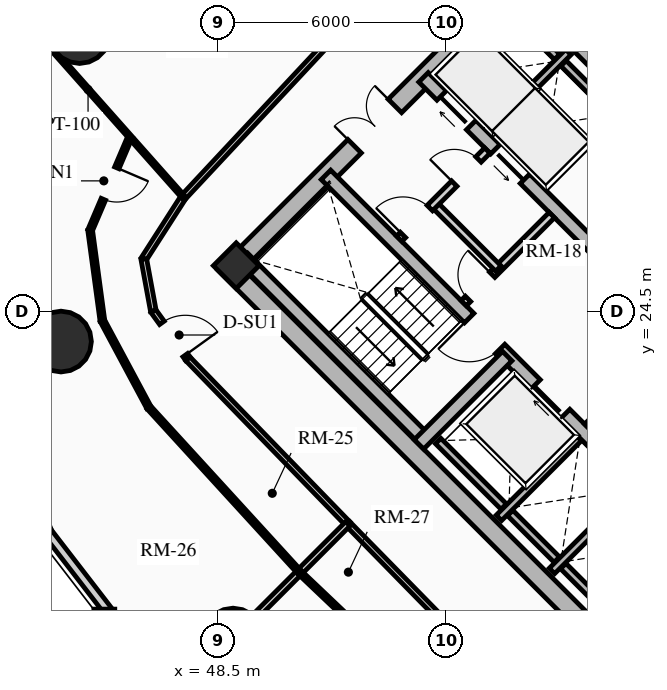
"""IFC4 building model, lengths in metres.
Left out: names, types, materials, properties, quantities, classifications, styles, units other than length and angle.
Written with IfcOpenShell. Run it as: python <this file> out.ifc"""

import sys

from ifc_helpers import new_model, si_unit, direction, frame, frame_2d, origin, origin_2d, place, context, subcontext, project, spatial, rectangle, circle, extrude, source, transform, mapped, element, fill, save


model = new_model("IFC4")
c1 = context("Model", 3, precision=1e-05, world=origin(), true_north=direction((0.0, 1.0)))
c2 = subcontext(c1, "Body", "Model", "MODEL_VIEW")
j1 = project(units=[si_unit("LENGTHUNIT", "METRE"), si_unit("PLANEANGLEUNIT", "RADIAN")], contexts=[c1])
p1 = place(None, origin())
s1 = spatial("IfcSite", under=j1, at=p1, CompositionType="ELEMENT")
p2 = place(p1, origin())
s2 = spatial("IfcBuilding", under=s1, at=p2, CompositionType="ELEMENT")
p3 = place(p2, frame((0.0, 0.0, 24.91)))
s3 = spatial("IfcBuildingStorey", under=s2, at=p3, CompositionType="ELEMENT", Elevation=24.91)
for number, where, z_axis, x_axis in (
    (1, (58.773, 15.661, 0.0), (0.0, 0.0, 1.0), (-0.707, 0.707, 0.0)),
    (2, (66.339, 23.227, 0.0), (0.0, 0.0, 1.0), (-0.707, 0.707, 0.0)),
):
    element("IfcWall", number, at=place(p3, frame(where, z_axis=z_axis, x_axis=x_axis)), inside=s3, PredefinedType="SHEAR", context=c2, shape_type="SweptSolid", body=[
        extrude(rectangle(XDim=14.3, YDim=0.5, at=frame_2d((7.15, 0.0))), origin(), (0.0, 0.0, 1.0), 2.91),
    ])
p4 = place(p3, frame((48.838, 25.596, 0.0), z_axis=(0.0, 0.0, 1.0), x_axis=(0.707106781187, 0.707106781187, 0.0)))
e3 = element("IfcWall", 3, at=p4, inside=s3, PredefinedType="SHEAR", context=c2, shape_type="SweptSolid", body=[
    extrude(rectangle(XDim=10.7, YDim=0.5, at=frame_2d((5.35, 0.0))), origin(), (0.0, 0.0, 1.0), 2.91),
])
m1 = source(origin(), c2, "Body", "SweptSolid", [
    extrude(rectangle(XDim=1.5, YDim=2.02, at=frame_2d((0.75, 1.01))), frame((0.0, 0.26, 0.0), z_axis=(0.0, -1.0, 0.0), x_axis=(1.0, 0.0, 0.0)), (0.0, 0.0, 1.0), 0.52),
])
p5 = place(p4, frame((4.6, 0.0, 0.0)))
e4 = element("IfcOpeningElement", 4, at=p5, cuts=e3, PredefinedType="OPENING", context=c2, shape_type="MappedRepresentation", body=[
    mapped(m1, transform((0.0, 0.0, 0.0), x_axis=(1.0, 0.0, 0.0), y_axis=(0.0, 1.0, 0.0), z_axis=(0.0, 0.0, 1.0), scale=1.0)),
])
p6 = place(p3, frame((61.096, 18.338, 0.0), z_axis=(0.0, 0.0, 1.0), x_axis=(-0.707106781187, 0.707106781187, 0.0)))
e5 = element("IfcWall", 5, at=p6, inside=s3, PredefinedType="SHEAR", context=c2, shape_type="SweptSolid", body=[
    extrude(rectangle(XDim=13.8, YDim=0.35, at=frame_2d((6.9, 0.0))), origin(), (0.0, 0.0, 1.0), 2.91),
])
m2 = source(origin(), c2, "Body", "SweptSolid", [
    extrude(rectangle(XDim=1.1, YDim=2.015, at=frame_2d((0.55, 1.007))), frame((0.0, 0.185, 0.0), z_axis=(0.0, -1.0, 0.0), x_axis=(1.0, 0.0, 0.0)), (0.0, 0.0, 1.0), 0.37),
])
p7 = place(p6, frame((4.9, 0.0, 0.0)))
e6 = element("IfcOpeningElement", 6, at=p7, cuts=e5, PredefinedType="OPENING", context=c2, shape_type="MappedRepresentation", body=[
    mapped(m2, transform((0.0, 0.0, 0.0), x_axis=(1.0, 0.0, 0.0), y_axis=(0.0, 1.0, 0.0), z_axis=(0.0, 0.0, 1.0), scale=1.0)),
])
m3 = source(origin(), c2, "Body", "SweptSolid", [
    extrude(rectangle(XDim=1.15, YDim=2.02, at=frame_2d((0.575, 1.01))), frame((0.0, 0.185, 0.0), z_axis=(0.0, -1.0, 0.0), x_axis=(1.0, 0.0, 0.0)), (0.0, 0.0, 1.0), 0.37),
])
p8 = place(p6, frame((7.32, 0.0, 0.0)))
e7 = element("IfcOpeningElement", 7, at=p8, cuts=e5, PredefinedType="OPENING", context=c2, shape_type="MappedRepresentation", body=[
    mapped(m3, transform((0.0, 0.0, 0.0), x_axis=(1.0, 0.0, 0.0), y_axis=(0.0, 1.0, 0.0), z_axis=(0.0, 0.0, 1.0), scale=1.0)),
])
p9 = place(p3, frame((63.662, 20.904, 0.0), z_axis=(0.0, 0.0, 1.0), x_axis=(-0.707106781187, 0.707106781187, 0.0)))
e8 = element("IfcWall", 8, at=p9, inside=s3, PredefinedType="SHEAR", context=c2, shape_type="SweptSolid", body=[
    extrude(rectangle(XDim=13.8, YDim=0.35, at=frame_2d((6.9, 0.0))), origin(), (0.0, 0.0, 1.0), 2.91),
])
p10 = place(p9, frame((10.025, 0.0, 0.0)))
e9 = element("IfcOpeningElement", 9, at=p10, cuts=e8, PredefinedType="OPENING", context=c2, shape_type="MappedRepresentation", body=[
    mapped(m2, transform((0.0, 0.0, 0.0), x_axis=(1.0, 0.0, 0.0), y_axis=(0.0, 1.0, 0.0), z_axis=(0.0, 0.0, 1.0), scale=1.0)),
])
p11 = place(p9, frame((12.025, 0.0, 0.0)))
e10 = element("IfcOpeningElement", 10, at=p11, cuts=e8, PredefinedType="OPENING", context=c2, shape_type="MappedRepresentation", body=[
    mapped(m2, transform((0.0, 0.0, 0.0), x_axis=(1.0, 0.0, 0.0), y_axis=(0.0, 1.0, 0.0), z_axis=(0.0, 0.0, 1.0), scale=1.0)),
])
p12 = place(p9, frame((5.33, 0.0, 0.0)))
e11 = element("IfcOpeningElement", 11, at=p12, cuts=e8, PredefinedType="OPENING", context=c2, shape_type="MappedRepresentation", body=[
    mapped(m3, transform((0.0, 0.0, 0.0), x_axis=(1.0, 0.0, 0.0), y_axis=(0.0, 1.0, 0.0), z_axis=(0.0, 0.0, 1.0), scale=1.0)),
])
p13 = place(p3, frame((53.922, 21.141, 0.0), z_axis=(0.0, 0.0, 1.0), x_axis=(-0.707106781187, 0.707106781187, 0.0)))
e12 = element("IfcWall", 12, at=p13, inside=s3, PredefinedType="SHEAR", context=c2, shape_type="SweptSolid", body=[
    extrude(rectangle(XDim=6.745, YDim=0.35, at=frame_2d((3.373, 0.0))), origin(), (0.0, 0.0, 1.0), 2.91),
])
p14 = place(p3, frame((53.784, 21.003, 0.0), z_axis=(0.0, 0.0, 1.0), x_axis=(0.707106781187, 0.707106781187, 0.0)))
e13 = element("IfcWall", 13, at=p14, inside=s3, PredefinedType="SHEAR", context=c2, shape_type="SweptSolid", body=[
    extrude(rectangle(XDim=3.285, YDim=0.35, at=frame_2d((1.643, 0.0))), origin(), (0.0, 0.0, 1.0), 2.91),
])
p15 = place(p3, frame((48.976, 25.706, 0.0), z_axis=(0.0, 0.0, 1.0), x_axis=(0.707106781187, 0.707106781187, 0.0)))
e14 = element("IfcColumn", 14, at=p15, inside=s3, PredefinedType="COLUMN", context=c2, shape_type="SweptSolid", body=[
    extrude(rectangle(XDim=0.85, YDim=0.85, at=origin_2d()), origin(), (0.0, 0.0, 1.0), 2.91),
])
for number, where, z_axis, x_axis in (
    (15, (44.854, 31.827, 0.0), (0.0, 0.0, 1.0), (1.0, 0.0, 0.0)),
    (16, (44.365, 23.709, 0.0), (0.0, 0.0, 1.0), (1.0, 0.0, 0.0)),
    (17, (48.893, 15.893, 0.0), (0.0, 0.0, 1.0), (1.0, 0.0, 0.0)),
):
    element("IfcColumn", number, at=place(p3, frame(where, z_axis=z_axis, x_axis=x_axis)), inside=s3, PredefinedType="USERDEFINED", context=c2, shape_type="SweptSolid", body=[
        extrude(circle(Radius=0.8, at=origin_2d()), origin(), (0.0, 0.0, 1.0), 2.91),
    ])
p16 = place(p3, frame((47.352, 14.352, 0.0), z_axis=(0.0, 0.0, 1.0), x_axis=(-0.610557396243, 0.791972010801, 0.0)))
e18 = element("IfcWall", 18, at=p16, inside=s3, PredefinedType="SOLIDWALL", context=c2, shape_type="SweptSolid", body=[
    extrude(rectangle(XDim=5.475, YDim=0.24, at=frame_2d((2.737, 0.0))), origin(), (0.0, 0.0, 1.0), 2.073),
])
p17 = place(p3, frame((55.888, 19.069, 0.0), z_axis=(0.0, 0.0, 1.0), x_axis=(0.707106781187, 0.707106781187, 0.0)))
e19 = element("IfcWall", 19, at=p17, inside=s3, PredefinedType="SHEAR", context=c2, shape_type="SweptSolid", body=[
    extrude(rectangle(XDim=2.97, YDim=0.2, at=frame_2d((1.485, 0.0))), origin(), (0.0, 0.0, 1.0), 2.91),
])
p18 = place(p3, frame((56.015, 19.366, 0.0), z_axis=(0.0, 0.0, 1.0), x_axis=(-0.707106781187, 0.707106781187, 0.0)))
e20 = element("IfcWall", 20, at=p18, inside=s3, PredefinedType="SHEAR", context=c2, shape_type="SweptSolid", body=[
    extrude(rectangle(XDim=2.44, YDim=0.2, at=frame_2d((1.22, 0.0))), origin(), (0.0, 0.0, 1.0), 2.91),
])
p19 = place(p3, frame((57.284, 17.673, 0.0), z_axis=(0.0, 0.0, 1.0), x_axis=(0.707147878904, 0.70706568108, 0.0)))
e21 = element("IfcWall", 21, at=p19, inside=s3, PredefinedType="SHEAR", context=c2, shape_type="SweptSolid", body=[
    extrude(rectangle(XDim=2.97, YDim=0.2, at=frame_2d((1.485, 0.0))), origin(), (0.0, 0.0, 1.0), 2.91),
])
p20 = place(p3, frame((57.412, 17.97, 0.0), z_axis=(0.0, 0.0, 1.0), x_axis=(-0.707106781187, 0.707106781187, 0.0)))
e22 = element("IfcWall", 22, at=p20, inside=s3, PredefinedType="SHEAR", context=c2, shape_type="SweptSolid", body=[
    extrude(rectangle(XDim=1.735, YDim=0.2, at=frame_2d((0.867, 0.0))), origin(), (0.0, 0.0, 1.0), 2.91),
])
p21 = place(p3, frame((58.737, 16.644, 0.0), z_axis=(0.0, 0.0, 1.0), x_axis=(-0.707032117043, 0.707181437447, 0.0)))
e23 = element("IfcWall", 23, at=p21, inside=s3, PredefinedType="SHEAR", context=c2, shape_type="SweptSolid", body=[
    extrude(rectangle(XDim=1.635, YDim=0.2, at=frame_2d((0.817, 0.0))), origin(), (0.0, 0.0, 1.0), 2.91),
])
p22 = place(p3, frame((57.062, 27.781, 0.0), z_axis=(0.0, 0.0, 1.0), x_axis=(0.707106781187, 0.707106781187, 0.0)))
e24 = element("IfcWall", 24, at=p22, inside=s3, PredefinedType="SHEAR", context=c2, shape_type="SweptSolid", body=[
    extrude(rectangle(XDim=2.97, YDim=0.2, at=frame_2d((1.485, 0.0))), origin(), (0.0, 0.0, 1.0), 2.91),
])
p23 = place(p3, frame((55.615, 29.227, 0.0), z_axis=(0.0, 0.0, 1.0), x_axis=(0.707147878904, 0.70706568108, 0.0)))
e25 = element("IfcWall", 25, at=p23, inside=s3, PredefinedType="SHEAR", context=c2, shape_type="SweptSolid", body=[
    extrude(rectangle(XDim=2.97, YDim=0.2, at=frame_2d((1.485, 0.0))), origin(), (0.0, 0.0, 1.0), 2.91),
])
p24 = place(p3, frame((58.865, 29.754, 0.0), z_axis=(0.0, 0.0, 1.0), x_axis=(-0.707174411312, 0.707039144592, 0.0)))
e26 = element("IfcWall", 26, at=p24, inside=s3, PredefinedType="SHEAR", context=c2, shape_type="SweptSolid", body=[
    extrude(rectangle(XDim=1.805, YDim=0.2, at=frame_2d((0.902, 0.0))), origin(), (0.0, 0.0, 1.0), 2.91),
])
p25 = place(p3, frame((57.419, 31.2, 0.0), z_axis=(0.0, 0.0, 1.0), x_axis=(-0.707032117043, 0.707181437447, 0.0)))
e27 = element("IfcWall", 27, at=p25, inside=s3, PredefinedType="SHEAR", context=c2, shape_type="SweptSolid", body=[
    extrude(rectangle(XDim=1.635, YDim=0.2, at=frame_2d((0.817, 0.0))), origin(), (0.0, 0.0, 1.0), 2.91),
])
p26 = place(p3, frame((58.214, 21.467, 0.0), z_axis=(0.0, 0.0, 1.0), x_axis=(0.707106781187, 0.707106781187, 0.0)))
e28 = element("IfcWall", 28, at=p26, inside=s3, PredefinedType="PARTITIONING", context=c2, shape_type="SweptSolid", body=[
    extrude(rectangle(XDim=3.28, YDim=0.2, at=frame_2d((1.64, 0.0))), origin(), (0.0, 0.0, 1.0), 2.635),
])
m4 = source(origin(), c2, "Body", "SweptSolid", [
    extrude(rectangle(XDim=1.5, YDim=2.02, at=frame_2d((0.75, 1.01))), frame((0.0, 0.11, 0.0), z_axis=(0.0, -1.0, 0.0), x_axis=(1.0, 0.0, 0.0)), (0.0, 0.0, 1.0), 0.22),
])
p27 = place(p26, frame((1.55, 0.0, 0.0)))
e29 = element("IfcOpeningElement", 29, at=p27, cuts=e28, PredefinedType="OPENING", context=c2, shape_type="MappedRepresentation", body=[
    mapped(m4, transform((0.0, 0.0, 0.0), x_axis=(1.0, 0.0, 0.0), y_axis=(0.0, 1.0, 0.0), z_axis=(0.0, 0.0, 1.0), scale=1.0)),
])
p28 = place(p3, frame((54.961, 24.719, 0.0), z_axis=(0.0, 0.0, 1.0), x_axis=(0.707106781187, 0.707106781187, 0.0)))
e30 = element("IfcWall", 30, at=p28, inside=s3, PredefinedType="PARTITIONING", context=c2, shape_type="SweptSolid", body=[
    extrude(rectangle(XDim=3.28, YDim=0.2, at=frame_2d((1.64, 0.0))), origin(), (0.0, 0.0, 1.0), 2.635),
])
m5 = source(origin(), c2, "Body", "SweptSolid", [
    extrude(rectangle(XDim=0.9, YDim=2.005, at=frame_2d((0.45, 1.002))), frame((0.0, 0.11, 0.0), z_axis=(0.0, -1.0, 0.0), x_axis=(1.0, 0.0, 0.0)), (0.0, 0.0, 1.0), 0.22),
])
p29 = place(p28, frame((0.16, 0.0, 0.0)))
e31 = element("IfcOpeningElement", 31, at=p29, cuts=e30, PredefinedType="OPENING", context=c2, shape_type="MappedRepresentation", body=[
    mapped(m5, transform((0.0, 0.0, 0.0), x_axis=(1.0, 0.0, 0.0), y_axis=(0.0, 1.0, 0.0), z_axis=(0.0, 0.0, 1.0), scale=1.0)),
])
p30 = place(p3, frame((55.874, 25.631, 0.0), z_axis=(0.0, 0.0, 1.0), x_axis=(-0.707157639372, 0.707055919343, 0.0)))
e32 = element("IfcWall", 32, at=p30, inside=s3, PredefinedType="PARTITIONING", context=c2, shape_type="SweptSolid", body=[
    extrude(rectangle(XDim=2.4, YDim=0.2, at=frame_2d((1.2, 0.0))), origin(), (0.0, 0.0, 1.0), 2.635),
])
p31 = place(p3, frame((53.264, 26.416, 0.0), z_axis=(0.0, 0.0, 1.0), x_axis=(0.707106781187, 0.707106781187, 0.0)))
e33 = element("IfcWall", 33, at=p31, inside=s3, PredefinedType="PARTITIONING", context=c2, shape_type="SweptSolid", body=[
    extrude(rectangle(XDim=3.28, YDim=0.2, at=frame_2d((1.64, 0.0))), origin(), (0.0, 0.0, 1.0), 2.635),
])
m6 = source(origin(), c2, "Body", "SweptSolid", [
    extrude(rectangle(XDim=1.0, YDim=2.015, at=frame_2d((0.5, 1.007))), frame((0.0, 0.11, 0.0), z_axis=(0.0, -1.0, 0.0), x_axis=(1.0, 0.0, 0.0)), (0.0, 0.0, 1.0), 0.22),
])
p32 = place(p31, frame((0.14, 0.0, 0.0)))
e34 = element("IfcOpeningElement", 34, at=p32, cuts=e33, PredefinedType="OPENING", context=c2, shape_type="MappedRepresentation", body=[
    mapped(m6, transform((0.0, 0.0, 0.0), x_axis=(1.0, 0.0, 0.0), y_axis=(0.0, 1.0, 0.0), z_axis=(0.0, 0.0, 1.0), scale=1.0)),
])
p33 = place(p31, frame((2.05, 0.0, 0.0)))
e35 = element("IfcOpeningElement", 35, at=p33, cuts=e33, PredefinedType="OPENING", context=c2, shape_type="MappedRepresentation", body=[
    mapped(m5, transform((0.0, 0.0, 0.0), x_axis=(1.0, 0.0, 0.0), y_axis=(0.0, 1.0, 0.0), z_axis=(0.0, 0.0, 1.0), scale=1.0)),
])
p34 = place(p3, frame((52.043, 32.28, 0.0), z_axis=(0.0, 0.0, 1.0), x_axis=(-0.682606081633, -0.730786519661, 0.0)))
e36 = element("IfcWall", 36, at=p34, inside=s3, PredefinedType="PARTITIONING", context=c2, shape_type="SweptSolid", body=[
    extrude(rectangle(XDim=6.527, YDim=0.15, at=frame_2d((3.263, 0.0))), origin(), (0.0, 0.0, 1.0), 2.159),
])
p35 = place(p3, frame((47.588, 27.51, 0.0), z_axis=(0.0, 0.0, 1.0), x_axis=(-0.540202619347, -0.841534984449, 0.0)))
e37 = element("IfcWall", 37, at=p35, inside=s3, PredefinedType="PARTITIONING", context=c2, shape_type="SweptSolid", body=[
    extrude(rectangle(XDim=1.935, YDim=0.15, at=frame_2d((0.967, 0.0))), origin(), (0.0, 0.0, 1.0), 2.159),
])
p36 = place(p3, frame((46.543, 25.882, 0.0), z_axis=(0.0, 0.0, 1.0), x_axis=(0.181153502579, -0.983454832976, 0.0)))
e38 = element("IfcWall", 38, at=p36, inside=s3, PredefinedType="PARTITIONING", context=c2, shape_type="SweptSolid", body=[
    extrude(rectangle(XDim=1.392, YDim=0.15, at=frame_2d((0.696, 0.0))), origin(), (0.0, 0.0, 1.0), 2.159),
])
p37 = place(p3, frame((46.795, 24.513, 0.0), z_axis=(0.0, 0.0, 1.0), x_axis=(0.585628197524, -0.810579801294, 0.0)))
e39 = element("IfcWall", 39, at=p37, inside=s3, PredefinedType="PARTITIONING", context=c2, shape_type="SweptSolid", body=[
    extrude(rectangle(XDim=1.554, YDim=0.15, at=frame_2d((0.777, 0.0))), origin(), (0.0, 0.0, 1.0), 2.205),
])
m7 = source(origin(), c2, "Body", "SweptSolid", [
    extrude(rectangle(XDim=1.05, YDim=2.015, at=frame_2d((0.525, 1.007))), frame((0.0, 0.085, 0.0), z_axis=(0.0, -1.0, 0.0), x_axis=(1.0, 0.0, 0.0)), (0.0, 0.0, 1.0), 0.17),
])
p38 = place(p37, frame((0.384, 0.0, 0.0)))
e40 = element("IfcOpeningElement", 40, at=p38, cuts=e39, PredefinedType="OPENING", context=c2, shape_type="MappedRepresentation", body=[
    mapped(m7, transform((0.0, 0.0, 0.0), x_axis=(1.0, 0.0, 0.0), y_axis=(0.0, 1.0, 0.0), z_axis=(0.0, 0.0, 1.0), scale=1.0)),
])
p39 = place(p3, frame((47.706, 23.253, 0.0), z_axis=(0.0, 0.0, 1.0), x_axis=(0.696179266346, -0.717867974707, 0.0)))
e41 = element("IfcWall", 41, at=p39, inside=s3, PredefinedType="PARTITIONING", context=c2, shape_type="SweptSolid", body=[
    extrude(rectangle(XDim=6.045, YDim=0.15, at=frame_2d((3.022, 0.0))), origin(), (0.0, 0.0, 1.0), 2.635),
])
p40 = place(p3, frame((51.914, 18.914, 0.0), z_axis=(0.0, 0.0, 1.0), x_axis=(0.699999313799, -0.714143515465, 0.0)))
e42 = element("IfcWall", 42, at=p40, inside=s3, PredefinedType="PARTITIONING", context=c2, shape_type="SweptSolid", body=[
    extrude(rectangle(XDim=6.162, YDim=0.15, at=frame_2d((3.081, 0.0))), origin(), (0.0, 0.0, 1.0), 2.159),
])
p41 = place(p3, frame((47.588, 27.51, 0.0), z_axis=(0.0, 0.0, 1.0), x_axis=(-0.663646630644, 0.74804622159, 0.0)))
e43 = element("IfcWall", 43, at=p41, inside=s3, PredefinedType="MOVABLE", context=c2, shape_type="SweptSolid", body=[
    extrude(rectangle(XDim=7.567, YDim=0.1, at=frame_2d((3.784, 0.0))), origin(), (0.0, 0.0, 1.0), 2.073),
])
p42 = place(p3, frame((51.914, 18.914, 0.0), z_axis=(0.0, 0.0, 1.0), x_axis=(-0.707106781187, -0.707106781187, 0.0)))
e44 = element("IfcWall", 44, at=p42, inside=s3, PredefinedType="PARTITIONING", context=c2, shape_type="SweptSolid", body=[
    extrude(rectangle(XDim=6.431, YDim=0.16, at=frame_2d((3.215, 0.0))), origin(), (0.0, 0.0, 1.0), 2.073),
])
p43 = place(p3, frame((46.182, 29.095, 0.0), z_axis=(0.0, 0.0, 1.0), x_axis=(-0.39298176502, -0.919546264394, 0.0)))
e45 = element("IfcWall", 45, at=p43, inside=s3, PredefinedType="PARTITIONING", context=c2, shape_type="SweptSolid", body=[
    extrude(rectangle(XDim=2.672, YDim=0.125, at=frame_2d((1.336, 0.0))), origin(), (0.0, 0.0, 1.0), 2.205),
])
m8 = source(origin(), c2, "Body", "SweptSolid", [
    extrude(rectangle(XDim=0.9, YDim=2.005, at=frame_2d((0.45, 1.002))), frame((0.0, 0.073, 0.0), z_axis=(0.0, -1.0, 0.0), x_axis=(1.0, 0.0, 0.0)), (0.0, 0.0, 1.0), 0.145),
])
p44 = place(p43, frame((0.886, 0.0, 0.0)))
e46 = element("IfcOpeningElement", 46, at=p44, cuts=e45, PredefinedType="OPENING", context=c2, shape_type="MappedRepresentation", body=[
    mapped(m8, transform((0.0, 0.0, 0.0), x_axis=(1.0, 0.0, 0.0), y_axis=(0.0, 1.0, 0.0), z_axis=(0.0, 0.0, 1.0), scale=1.0)),
])
p45 = place(p3, frame((45.132, 26.638, 0.0), z_axis=(0.0, 0.0, 1.0), x_axis=(0.134279147929, -0.990943545532, 0.0)))
e47 = element("IfcWall", 47, at=p45, inside=s3, PredefinedType="PARTITIONING", context=c2, shape_type="SweptSolid", body=[
    extrude(rectangle(XDim=2.404, YDim=0.125, at=frame_2d((1.202, 0.0))), origin(), (0.0, 0.0, 1.0), 2.159),
])
p46 = place(p3, frame((45.455, 24.256, 0.0), z_axis=(0.0, 0.0, 1.0), x_axis=(0.472268582458, -0.881454698792, 0.0)))
e48 = element("IfcWall", 48, at=p46, inside=s3, PredefinedType="PARTITIONING", context=c2, shape_type="SweptSolid", body=[
    extrude(rectangle(XDim=2.585, YDim=0.125, at=frame_2d((1.292, 0.0))), origin(), (0.0, 0.0, 1.0), 2.159),
])
p47 = place(p3, frame((46.676, 21.978, 0.0), z_axis=(0.0, 0.0, 1.0), x_axis=(0.67473816271, -0.738057187339, 0.0)))
e49 = element("IfcWall", 49, at=p47, inside=s3, PredefinedType="PARTITIONING", context=c2, shape_type="SweptSolid", body=[
    extrude(rectangle(XDim=5.876, YDim=0.125, at=frame_2d((2.938, 0.0))), origin(), (0.0, 0.0, 1.0), 2.635),
])
p48 = place(p3, frame((50.641, 17.641, 0.0), z_axis=(0.0, 0.0, 1.0), x_axis=(0.724909383019, -0.688844239586, 0.0)))
e50 = element("IfcWall", 50, at=p48, inside=s3, PredefinedType="PARTITIONING", context=c2, shape_type="SweptSolid", body=[
    extrude(rectangle(XDim=5.957, YDim=0.125, at=frame_2d((2.979, 0.0))), origin(), (0.0, 0.0, 1.0), 2.159),
])
m9 = source(origin(), c2, "Body", "SweptSolid", [
    extrude(rectangle(XDim=1.1, YDim=2.015, at=frame_2d((0.55, 1.007))), frame((0.0, 0.025, 0.0), z_axis=(0.0, -1.0, 0.0), x_axis=(1.0, 0.0, 0.0)), (0.0, 0.0, 1.0), 0.05),
])
p49 = place(p7, origin())
e51 = element("IfcDoor", 51, at=p49, inside=s3, OperationType="SLIDING_TO_RIGHT", PredefinedType="DOOR", context=c2, shape_type="MappedRepresentation", body=[
    mapped(m9, transform((0.0, 0.0, 0.0), x_axis=(1.0, 0.0, 0.0), y_axis=(0.0, 1.0, 0.0), z_axis=(0.0, 0.0, 1.0), scale=1.0)),
])
fill(e6, e51)
p50 = place(p10, origin())
e52 = element("IfcDoor", 52, at=p50, inside=s3, OperationType="SLIDING_TO_LEFT", PredefinedType="DOOR", context=c2, shape_type="MappedRepresentation", body=[
    mapped(m9, transform((0.0, 0.0, 0.0), x_axis=(1.0, 0.0, 0.0), y_axis=(0.0, 1.0, 0.0), z_axis=(0.0, 0.0, 1.0), scale=1.0)),
])
fill(e9, e52)
p51 = place(p11, origin())
e53 = element("IfcDoor", 53, at=p51, inside=s3, OperationType="SLIDING_TO_RIGHT", PredefinedType="DOOR", context=c2, shape_type="MappedRepresentation", body=[
    mapped(m9, transform((0.0, 0.0, 0.0), x_axis=(1.0, 0.0, 0.0), y_axis=(0.0, 1.0, 0.0), z_axis=(0.0, 0.0, 1.0), scale=1.0)),
])
fill(e10, e53)
m10 = source(origin(), c2, "Body", "SweptSolid", [
    extrude(rectangle(XDim=1.15, YDim=2.02, at=frame_2d((0.575, 1.01))), frame((0.0, 0.025, 0.0), z_axis=(0.0, -1.0, 0.0), x_axis=(1.0, 0.0, 0.0)), (0.0, 0.0, 1.0), 0.05),
])
p52 = place(p8, origin())
e54 = element("IfcDoor", 54, at=p52, inside=s3, OperationType="SINGLE_SWING_RIGHT", PredefinedType="DOOR", context=c2, shape_type="MappedRepresentation", body=[
    mapped(m10, transform((0.0, 0.0, 0.0), x_axis=(1.0, 0.0, 0.0), y_axis=(0.0, 1.0, 0.0), z_axis=(0.0, 0.0, 1.0), scale=1.0)),
])
fill(e7, e54)
m11 = source(origin(), c2, "Body", "SweptSolid", [
    extrude(rectangle(XDim=1.5, YDim=2.02, at=frame_2d((0.75, 1.01))), frame((0.0, 0.025, 0.0), z_axis=(0.0, -1.0, 0.0), x_axis=(1.0, 0.0, 0.0)), (0.0, 0.0, 1.0), 0.05),
])
p53 = place(p5, origin())
e55 = element("IfcDoor", 55, at=p53, inside=s3, OperationType="DOUBLE_DOOR_SINGLE_SWING", PredefinedType="DOOR", context=c2, shape_type="MappedRepresentation", body=[
    mapped(m11, transform((0.0, 0.0, 0.0), x_axis=(1.0, 0.0, 0.0), y_axis=(0.0, 1.0, 0.0), z_axis=(0.0, 0.0, 1.0), scale=1.0)),
])
fill(e4, e55)
m12 = source(origin(), c2, "Body", "SweptSolid", [
    extrude(rectangle(XDim=0.9, YDim=2.005, at=frame_2d((0.45, 1.002))), frame((0.0, 0.025, 0.0), z_axis=(0.0, -1.0, 0.0), x_axis=(1.0, 0.0, 0.0)), (0.0, 0.0, 1.0), 0.05),
])
p54 = place(p29, origin())
e56 = element("IfcDoor", 56, at=p54, inside=s3, OperationType="SINGLE_SWING_RIGHT", PredefinedType="DOOR", context=c2, shape_type="MappedRepresentation", body=[
    mapped(m12, transform((0.0, 0.0, 0.0), x_axis=(1.0, 0.0, 0.0), y_axis=(0.0, 1.0, 0.0), z_axis=(0.0, 0.0, 1.0), scale=1.0)),
])
fill(e31, e56)
m13 = source(origin(), c2, "Body", "SweptSolid", [
    extrude(rectangle(XDim=1.0, YDim=2.015, at=frame_2d((0.5, 1.007))), frame((0.0, 0.025, 0.0), z_axis=(0.0, -1.0, 0.0), x_axis=(1.0, 0.0, 0.0)), (0.0, 0.0, 1.0), 0.05),
])
p55 = place(p32, origin())
e57 = element("IfcDoor", 57, at=p55, inside=s3, OperationType="SINGLE_SWING_LEFT", PredefinedType="DOOR", context=c2, shape_type="MappedRepresentation", body=[
    mapped(m13, transform((0.0, 0.0, 0.0), x_axis=(1.0, 0.0, 0.0), y_axis=(0.0, 1.0, 0.0), z_axis=(0.0, 0.0, 1.0), scale=1.0)),
])
fill(e34, e57)
p56 = place(p33, origin())
e58 = element("IfcDoor", 58, at=p56, inside=s3, OperationType="SINGLE_SWING_LEFT", PredefinedType="DOOR", context=c2, shape_type="MappedRepresentation", body=[
    mapped(m12, transform((0.0, 0.0, 0.0), x_axis=(1.0, 0.0, 0.0), y_axis=(0.0, 1.0, 0.0), z_axis=(0.0, 0.0, 1.0), scale=1.0)),
])
fill(e35, e58)
m14 = source(origin(), c2, "Body", "SweptSolid", [
    extrude(rectangle(XDim=1.05, YDim=2.015, at=frame_2d((0.525, 1.007))), frame((0.0, 0.025, 0.0), z_axis=(0.0, -1.0, 0.0), x_axis=(1.0, 0.0, 0.0)), (0.0, 0.0, 1.0), 0.05),
])
p57 = place(p38, origin())
e59 = element("IfcDoor", 59, at=p57, inside=s3, OperationType="SINGLE_SWING_RIGHT", PredefinedType="DOOR", context=c2, shape_type="MappedRepresentation", body=[
    mapped(m14, transform((0.0, 0.0, 0.0), x_axis=(1.0, 0.0, 0.0), y_axis=(0.0, 1.0, 0.0), z_axis=(0.0, 0.0, 1.0), scale=1.0)),
])
fill(e40, e59)
p58 = place(p44, origin())
e60 = element("IfcDoor", 60, at=p58, inside=s3, OperationType="SINGLE_SWING_LEFT", PredefinedType="DOOR", context=c2, shape_type="MappedRepresentation", body=[
    mapped(m12, transform((0.0, 0.0, 0.0), x_axis=(1.0, 0.0, 0.0), y_axis=(0.0, 1.0, 0.0), z_axis=(0.0, 0.0, 1.0), scale=1.0)),
])
fill(e46, e60)
save(model, sys.argv[1])
